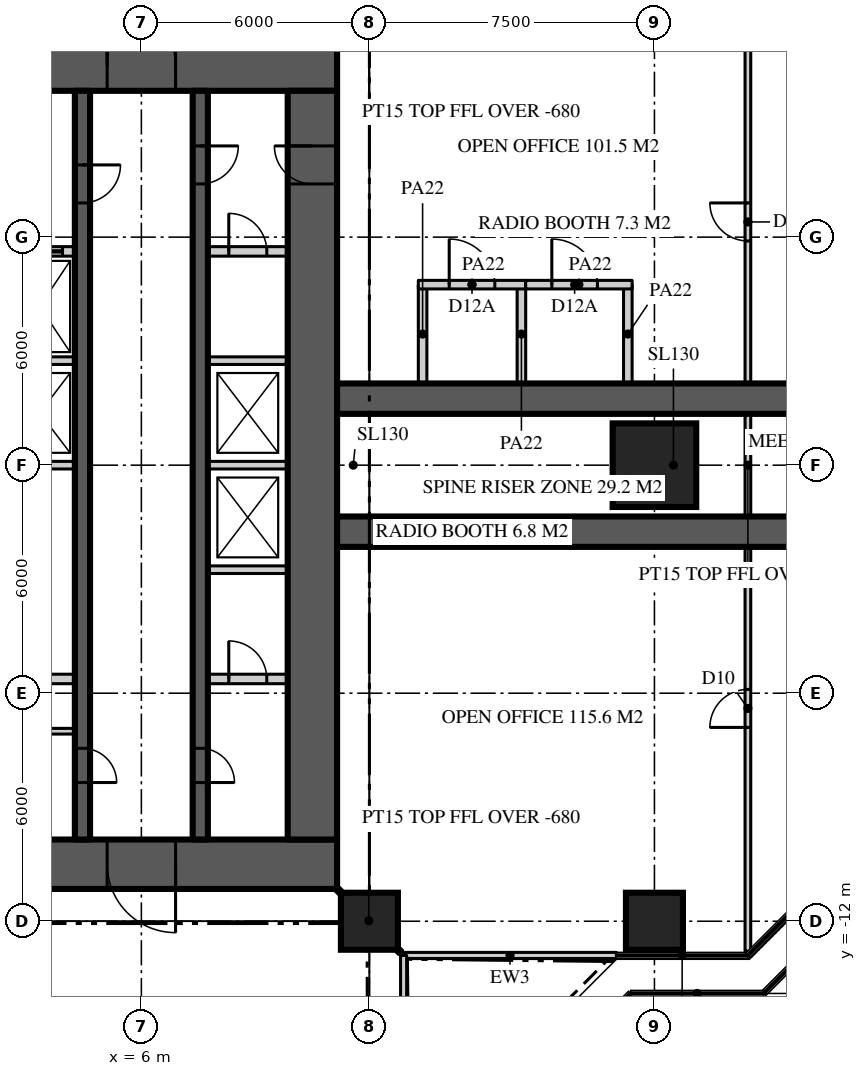
"""IFC4 building model, lengths in metres.
Left out: names, types, materials, properties, quantities, classifications, styles, units other than length and angle.
Written with IfcOpenShell. Run it as: python <this file> out.ifc"""

import sys

from ifc_helpers import new_model, si_unit, direction, frame, frame_2d, origin, origin_2d, place, context, subcontext, project, spatial, rectangle, extrude, element, fill, save


model = new_model("IFC4")
c1 = context("Model", 3, precision=1e-05, world=origin(), true_north=direction((0.0, 1.0)))
c2 = subcontext(c1, "Body", "Model", "MODEL_VIEW")
j1 = project(units=[si_unit("LENGTHUNIT", "METRE"), si_unit("PLANEANGLEUNIT", "RADIAN")], contexts=[c1])
p1 = place(None, origin())
s1 = spatial("IfcSite", under=j1, at=p1, CompositionType="ELEMENT")
p2 = place(p1, origin())
s2 = spatial("IfcBuilding", under=s1, at=p2, CompositionType="ELEMENT")
p3 = place(p2, frame((0.0, 0.0, 212.7)))
s3 = spatial("IfcBuildingStorey", under=s2, at=p3, CompositionType="ELEMENT", Elevation=212.7)
p4 = place(p3, frame((-11.15, 10.5, 0.0), z_axis=(0.0, 0.0, 1.0), x_axis=(1.0, 0.0, 0.0)))
e1 = element("IfcWall", 1, at=p4, inside=s3, PredefinedType="SHEAR", context=c2, shape_type="SweptSolid", body=[
    extrude(rectangle(XDim=22.3, YDim=1.3, at=frame_2d((11.15, 0.0))), origin(), (0.0, 0.0, 1.0), 3.9),
])
p5 = place(p4, frame((4.25, 0.0, 0.0)))
e2 = element("IfcOpeningElement", 2, at=p5, cuts=e1, PredefinedType="OPENING", context=c2, shape_type="SweptSolid", body=[
    extrude(rectangle(XDim=1.8, YDim=2.2, at=frame_2d((0.9, 1.1))), frame((0.0, 0.66, 0.0), z_axis=(0.0, -1.0, 0.0), x_axis=(1.0, 0.0, 0.0)), (0.0, 0.0, 1.0), 1.32),
])
p6 = place(p4, frame((16.25, 0.0, 0.0)))
e3 = element("IfcOpeningElement", 3, at=p6, cuts=e1, PredefinedType="OPENING", context=c2, shape_type="SweptSolid", body=[
    extrude(rectangle(XDim=1.8, YDim=2.2, at=frame_2d((0.9, 1.1))), frame((0.0, 0.66, 0.0), z_axis=(0.0, -1.0, 0.0), x_axis=(1.0, 0.0, 0.0)), (0.0, 0.0, 1.0), 1.32),
])
p7 = place(p3, frame((11.15, -10.5, 0.0), z_axis=(0.0, 0.0, 1.0), x_axis=(-1.0, 0.0, 0.0)))
e4 = element("IfcWall", 4, at=p7, inside=s3, PredefinedType="SHEAR", context=c2, shape_type="SweptSolid", body=[
    extrude(rectangle(XDim=22.3, YDim=1.3, at=frame_2d((11.15, 0.0))), origin(), (0.0, 0.0, 1.0), 3.9),
])
p8 = place(p7, frame((16.25, 0.0, 0.0)))
e5 = element("IfcOpeningElement", 5, at=p8, cuts=e4, PredefinedType="OPENING", context=c2, shape_type="SweptSolid", body=[
    extrude(rectangle(XDim=1.8, YDim=2.2, at=frame_2d((0.9, 1.1))), frame((0.0, 0.66, 0.0), z_axis=(0.0, -1.0, 0.0), x_axis=(1.0, 0.0, 0.0)), (0.0, 0.0, 1.0), 1.32),
])
p9 = place(p7, frame((4.25, 0.0, 0.0)))
e6 = element("IfcOpeningElement", 6, at=p9, cuts=e4, PredefinedType="OPENING", context=c2, shape_type="SweptSolid", body=[
    extrude(rectangle(XDim=1.8, YDim=2.2, at=frame_2d((0.9, 1.1))), frame((0.0, 0.66, 0.0), z_axis=(0.0, -1.0, 0.0), x_axis=(1.0, 0.0, 0.0)), (0.0, 0.0, 1.0), 1.32),
])
p10 = place(p3, frame((10.5, -9.85, 0.0), z_axis=(0.0, 0.0, 1.0), x_axis=(0.0, 1.0, 0.0)))
e7 = element("IfcWall", 7, at=p10, inside=s3, PredefinedType="SHEAR", context=c2, shape_type="SweptSolid", body=[
    extrude(rectangle(XDim=19.7, YDim=1.3, at=frame_2d((9.85, 0.0))), origin(), (0.0, 0.0, 1.0), 3.9),
])
p11 = place(p10, frame((17.25, 0.0, 0.0)))
e8 = element("IfcOpeningElement", 8, at=p11, cuts=e7, PredefinedType="OPENING", context=c2, shape_type="SweptSolid", body=[
    extrude(rectangle(XDim=1.0, YDim=2.2, at=frame_2d((0.5, 1.1))), frame((0.0, 0.66, 0.0), z_axis=(0.0, -1.0, 0.0), x_axis=(1.0, 0.0, 0.0)), (0.0, 0.0, 1.0), 1.32),
])
for number, where, z_axis, x_axis in (
    (9, (11.15, -1.75, 0.0), (0.0, 0.0, 1.0), (1.0, 0.0, 0.0)),
    (10, (11.15, 1.75, 0.0), (0.0, 0.0, 1.0), (1.0, 0.0, 0.0)),
):
    element("IfcWall", number, at=place(p3, frame(where, z_axis=z_axis, x_axis=x_axis)), inside=s3, PredefinedType="SHEAR", context=c2, shape_type="SweptSolid", body=[
        extrude(rectangle(XDim=15.25, YDim=0.8, at=frame_2d((7.625, 0.0))), origin(), (0.0, 0.0, 1.0), 3.9),
    ])
for number, where, z_axis, x_axis in (
    (11, (12.0, -12.0, 0.0), (0.0, 0.0, 1.0), (1.0, 0.0, 0.0)),
    (12, (19.5, -12.0, 0.0), (0.0, 0.0, 1.0), (1.0, 0.0, 0.0)),
):
    element("IfcColumn", number, at=place(p3, frame(where, z_axis=z_axis, x_axis=x_axis)), inside=s3, PredefinedType="COLUMN", context=c2, shape_type="SweptSolid", body=[
        extrude(rectangle(XDim=1.5, YDim=1.5, at=origin_2d()), origin(), (0.0, 0.0, 1.0), 3.9),
    ])
p12 = place(p3, frame((19.5, 0.0, 0.0), z_axis=(0.0, 0.0, 1.0), x_axis=(1.0, 0.0, 0.0)))
e13 = element("IfcColumn", 13, at=p12, inside=s3, PredefinedType="COLUMN", context=c2, shape_type="SweptSolid", body=[
    extrude(rectangle(XDim=2.2, YDim=2.2, at=origin_2d()), origin(), (0.0, 0.0, 1.0), 3.9),
])
p13 = place(p3, frame((12.9, -12.9, 0.0), z_axis=(0.0, 0.0, 1.0), x_axis=(1.0, 0.0, 0.0)))
e14 = element("IfcWall", 14, at=p13, inside=s3, PredefinedType="SOLIDWALL", context=c2, shape_type="SweptSolid", body=[
    extrude(rectangle(XDim=5.6, YDim=0.16, at=frame_2d((2.8, 0.0))), origin(), (0.0, 0.0, 1.0), 3.77),
])
p14 = place(p3, frame((12.9, -18.5, 0.0), z_axis=(0.0, 0.0, 1.0), x_axis=(0.0, 1.0, 0.0)))
e15 = element("IfcWall", 15, at=p14, inside=s3, PredefinedType="SOLIDWALL", context=c2, shape_type="SweptSolid", body=[
    extrude(rectangle(XDim=5.6, YDim=0.16, at=frame_2d((2.8, 0.0))), origin(), (0.0, 0.0, 1.0), 3.77),
])
p15 = place(p14, frame((2.3, 0.0, 0.0)))
e16 = element("IfcOpeningElement", 16, at=p15, cuts=e15, PredefinedType="OPENING", context=c2, shape_type="SweptSolid", body=[
    extrude(rectangle(XDim=1.0, YDim=2.2, at=frame_2d((0.5, 1.1))), frame((0.0, 0.09, 0.0), z_axis=(0.0, -1.0, 0.0), x_axis=(1.0, 0.0, 0.0)), (0.0, 0.0, 1.0), 0.18),
])
p16 = place(p3, frame((7.55, 9.85, 0.0), z_axis=(0.0, 0.0, 1.0), x_axis=(0.0, -1.0, 0.0)))
e17 = element("IfcWall", 17, at=p16, inside=s3, PredefinedType="SHEAR", context=c2, shape_type="SweptSolid", body=[
    extrude(rectangle(XDim=19.7, YDim=0.4, at=frame_2d((9.85, 0.0))), origin(), (0.0, 0.0, 1.0), 3.9),
])
p17 = place(p16, frame((1.45, 0.0, 0.0)))
e18 = element("IfcOpeningElement", 18, at=p17, cuts=e17, PredefinedType="OPENING", context=c2, shape_type="SweptSolid", body=[
    extrude(rectangle(XDim=1.0, YDim=2.2, at=frame_2d((0.5, 1.1))), frame((0.0, 0.21, 0.0), z_axis=(0.0, -1.0, 0.0), x_axis=(1.0, 0.0, 0.0)), (0.0, 0.0, 1.0), 0.42),
])
p18 = place(p16, frame((17.3, 0.0, 0.0)))
e19 = element("IfcOpeningElement", 19, at=p18, cuts=e17, PredefinedType="OPENING", context=c2, shape_type="SweptSolid", body=[
    extrude(rectangle(XDim=0.9, YDim=2.1, at=frame_2d((0.45, 1.05))), frame((0.0, 0.21, 0.0), z_axis=(0.0, -1.0, 0.0), x_axis=(1.0, 0.0, 0.0)), (0.0, 0.0, 1.0), 0.42),
])
p19 = place(p3, frame((4.45, 9.85, 0.0), z_axis=(0.0, 0.0, 1.0), x_axis=(0.0, -1.0, 0.0)))
e20 = element("IfcWall", 20, at=p19, inside=s3, PredefinedType="SHEAR", context=c2, shape_type="SweptSolid", body=[
    extrude(rectangle(XDim=19.7, YDim=0.4, at=frame_2d((9.85, 0.0))), origin(), (0.0, 0.0, 1.0), 3.9),
])
p20 = place(p19, frame((1.95, 0.0, 0.0)))
e21 = element("IfcOpeningElement", 21, at=p20, cuts=e20, PredefinedType="OPENING", context=c2, shape_type="SweptSolid", body=[
    extrude(rectangle(XDim=1.0, YDim=2.2, at=frame_2d((0.5, 1.1))), frame((0.0, 0.21, 0.0), z_axis=(0.0, -1.0, 0.0), x_axis=(1.0, 0.0, 0.0)), (0.0, 0.0, 1.0), 0.42),
])
p21 = place(p19, frame((17.3, 0.0, 0.0)))
e22 = element("IfcOpeningElement", 22, at=p21, cuts=e20, PredefinedType="OPENING", context=c2, shape_type="SweptSolid", body=[
    extrude(rectangle(XDim=0.9, YDim=2.1, at=frame_2d((0.45, 1.05))), frame((0.0, 0.21, 0.0), z_axis=(0.0, -1.0, 0.0), x_axis=(1.0, 0.0, 0.0)), (0.0, 0.0, 1.0), 0.42),
])
p22 = place(p3, frame((2.4, 5.625, 0.0), z_axis=(0.0, 0.0, 1.0), x_axis=(1.0, 0.0, 0.0)))
e23 = element("IfcWall", 23, at=p22, inside=s3, PredefinedType="SOLIDWALL", context=c2, shape_type="SweptSolid", body=[
    extrude(rectangle(XDim=1.85, YDim=0.25, at=frame_2d((0.925, 0.0))), origin(), (0.0, 0.0, 1.0), 3.7),
])
p23 = place(p22, frame((0.325, 0.0, 0.0)))
e24 = element("IfcOpeningElement", 24, at=p23, cuts=e23, PredefinedType="OPENING", context=c2, shape_type="SweptSolid", body=[
    extrude(rectangle(XDim=1.2, YDim=2.2, at=frame_2d((0.6, 1.1))), frame((0.0, 0.135, 0.0), z_axis=(0.0, -1.0, 0.0), x_axis=(1.0, 0.0, 0.0)), (0.0, 0.0, 1.0), 0.27),
])
p24 = place(p3, frame((7.75, 5.625, 0.0), z_axis=(0.0, 0.0, 1.0), x_axis=(1.0, 0.0, 0.0)))
e25 = element("IfcWall", 25, at=p24, inside=s3, PredefinedType="SOLIDWALL", context=c2, shape_type="SweptSolid", body=[
    extrude(rectangle(XDim=2.1, YDim=0.25, at=frame_2d((1.05, 0.0))), origin(), (0.0, 0.0, 1.0), 3.7),
])
p25 = place(p24, frame((0.55, 0.0, 0.0)))
e26 = element("IfcOpeningElement", 26, at=p25, cuts=e25, PredefinedType="OPENING", context=c2, shape_type="SweptSolid", body=[
    extrude(rectangle(XDim=1.0, YDim=2.2, at=frame_2d((0.5, 1.1))), frame((0.0, 0.135, 0.0), z_axis=(0.0, -1.0, 0.0), x_axis=(1.0, 0.0, 0.0)), (0.0, 0.0, 1.0), 0.27),
])
p26 = place(p3, frame((2.4, -5.625, 0.0), z_axis=(0.0, 0.0, 1.0), x_axis=(1.0, 0.0, 0.0)))
e27 = element("IfcWall", 27, at=p26, inside=s3, PredefinedType="SOLIDWALL", context=c2, shape_type="SweptSolid", body=[
    extrude(rectangle(XDim=1.85, YDim=0.25, at=frame_2d((0.925, 0.0))), origin(), (0.0, 0.0, 1.0), 3.7),
])
p27 = place(p3, frame((7.75, -5.625, 0.0), z_axis=(0.0, 0.0, 1.0), x_axis=(1.0, 0.0, 0.0)))
e28 = element("IfcWall", 28, at=p27, inside=s3, PredefinedType="SOLIDWALL", context=c2, shape_type="SweptSolid", body=[
    extrude(rectangle(XDim=2.1, YDim=0.25, at=frame_2d((1.05, 0.0))), origin(), (0.0, 0.0, 1.0), 3.7),
])
p28 = place(p27, frame((0.55, 0.0, 0.0)))
e29 = element("IfcOpeningElement", 29, at=p28, cuts=e28, PredefinedType="OPENING", context=c2, shape_type="SweptSolid", body=[
    extrude(rectangle(XDim=1.0, YDim=2.2, at=frame_2d((0.5, 1.1))), frame((0.0, 0.135, 0.0), z_axis=(0.0, -1.0, 0.0), x_axis=(1.0, 0.0, 0.0)), (0.0, 0.0, 1.0), 0.27),
])
p29 = place(p3, frame((7.75, -2.75, 0.0), z_axis=(0.0, 0.0, 1.0), x_axis=(1.0, 0.0, 0.0)))
e30 = element("IfcWall", 30, at=p29, inside=s3, PredefinedType="SOLIDWALL", context=c2, shape_type="SweptSolid", body=[
    extrude(rectangle(XDim=2.1, YDim=0.2, at=frame_2d((1.05, 0.0))), origin(), (0.0, 0.0, 1.0), 3.7),
])
p30 = place(p3, frame((2.4, 0.0, 0.0), z_axis=(0.0, 0.0, 1.0), x_axis=(1.0, 0.0, 0.0)))
e31 = element("IfcWall", 31, at=p30, inside=s3, PredefinedType="SOLIDWALL", context=c2, shape_type="SweptSolid", body=[
    extrude(rectangle(XDim=1.85, YDim=0.2, at=frame_2d((0.925, 0.0))), origin(), (0.0, 0.0, 1.0), 3.7),
])
p31 = place(p3, frame((7.75, 0.0, 0.0), z_axis=(0.0, 0.0, 1.0), x_axis=(1.0, 0.0, 0.0)))
e32 = element("IfcWall", 32, at=p31, inside=s3, PredefinedType="SOLIDWALL", context=c2, shape_type="SweptSolid", body=[
    extrude(rectangle(XDim=2.1, YDim=0.2, at=frame_2d((1.05, 0.0))), origin(), (0.0, 0.0, 1.0), 3.7),
])
p32 = place(p3, frame((2.4, 2.75, 0.0), z_axis=(0.0, 0.0, 1.0), x_axis=(1.0, 0.0, 0.0)))
e33 = element("IfcWall", 33, at=p32, inside=s3, PredefinedType="SOLIDWALL", context=c2, shape_type="SweptSolid", body=[
    extrude(rectangle(XDim=1.85, YDim=0.2, at=frame_2d((0.925, 0.0))), origin(), (0.0, 0.0, 1.0), 3.7),
])
p33 = place(p3, frame((7.75, 2.75, 0.0), z_axis=(0.0, 0.0, 1.0), x_axis=(1.0, 0.0, 0.0)))
e34 = element("IfcWall", 34, at=p33, inside=s3, PredefinedType="SOLIDWALL", context=c2, shape_type="SweptSolid", body=[
    extrude(rectangle(XDim=2.1, YDim=0.2, at=frame_2d((1.05, 0.0))), origin(), (0.0, 0.0, 1.0), 3.7),
])
p34 = place(p3, frame((21.959, -12.786, 0.0), z_axis=(0.0, 0.0, 1.0), x_axis=(0.0, 1.0, 0.0)))
e35 = element("IfcWall", 35, at=p34, inside=s3, PredefinedType="PARTITIONING", context=c2, shape_type="SweptSolid", body=[
    extrude(rectangle(XDim=25.573, YDim=0.15, at=frame_2d((12.786, 0.0))), origin(), (0.0, 0.0, 1.0), 3.77),
])
p35 = place(p34, frame((18.687, 0.0, 0.0)))
e36 = element("IfcOpeningElement", 36, at=p35, cuts=e35, PredefinedType="OPENING", context=c2, shape_type="SweptSolid", body=[
    extrude(rectangle(XDim=1.0, YDim=2.2, at=frame_2d((0.5, 1.1))), frame((0.0, 0.085, 0.0), z_axis=(0.0, -1.0, 0.0), x_axis=(1.0, 0.0, 0.0)), (0.0, 0.0, 1.0), 0.17),
])
p36 = place(p34, frame((5.886, 0.0, 0.0)))
e37 = element("IfcOpeningElement", 37, at=p36, cuts=e35, PredefinedType="OPENING", context=c2, shape_type="SweptSolid", body=[
    extrude(rectangle(XDim=1.0, YDim=2.2, at=frame_2d((0.5, 1.1))), frame((0.0, 0.085, 0.0), z_axis=(0.0, -1.0, 0.0), x_axis=(1.0, 0.0, 0.0)), (0.0, 0.0, 1.0), 0.17),
])
for number, where, z_axis, x_axis in (
    (38, (13.4, 2.15, 0.0), (0.0, 0.0, 1.0), (0.0, 1.0, 0.0)),
    (39, (16.0, 2.15, 0.0), (0.0, 0.0, 1.0), (0.0, 1.0, 0.0)),
):
    element("IfcWall", number, at=place(p3, frame(where, z_axis=z_axis, x_axis=x_axis)), inside=s3, PredefinedType="PARTITIONING", context=c2, shape_type="SweptSolid", body=[
        extrude(rectangle(XDim=2.6, YDim=0.225, at=frame_2d((1.3, 0.0))), origin(), (0.0, 0.0, 1.0), 3.77),
    ])
p37 = place(p3, frame((13.288, 4.75, 0.0), z_axis=(0.0, 0.0, 1.0), x_axis=(1.0, 0.0, 0.0)))
e40 = element("IfcWall", 40, at=p37, inside=s3, PredefinedType="PARTITIONING", context=c2, shape_type="SweptSolid", body=[
    extrude(rectangle(XDim=2.825, YDim=0.225, at=frame_2d((1.413, 0.0))), origin(), (0.0, 0.0, 1.0), 3.77),
])
p38 = place(p37, frame((0.812, 0.0, 0.0)))
e41 = element("IfcOpeningElement", 41, at=p38, cuts=e40, PredefinedType="OPENING", context=c2, shape_type="SweptSolid", body=[
    extrude(rectangle(XDim=1.2, YDim=2.2, at=frame_2d((0.6, 1.1))), frame((0.0, 0.123, 0.0), z_axis=(0.0, -1.0, 0.0), x_axis=(1.0, 0.0, 0.0)), (0.0, 0.0, 1.0), 0.245),
])
p39 = place(p3, frame((18.8, 2.15, 0.0), z_axis=(0.0, 0.0, 1.0), x_axis=(0.0, 1.0, 0.0)))
e42 = element("IfcWall", 42, at=p39, inside=s3, PredefinedType="PARTITIONING", context=c2, shape_type="SweptSolid", body=[
    extrude(rectangle(XDim=2.6, YDim=0.225, at=frame_2d((1.3, 0.0))), origin(), (0.0, 0.0, 1.0), 3.77),
])
p40 = place(p3, frame((16.113, 4.75, 0.0), z_axis=(0.0, 0.0, 1.0), x_axis=(1.0, 0.0, 0.0)))
e43 = element("IfcWall", 43, at=p40, inside=s3, PredefinedType="PARTITIONING", context=c2, shape_type="SweptSolid", body=[
    extrude(rectangle(XDim=2.8, YDim=0.225, at=frame_2d((1.4, 0.0))), origin(), (0.0, 0.0, 1.0), 3.77),
])
p41 = place(p40, frame((0.688, 0.0, 0.0)))
e44 = element("IfcOpeningElement", 44, at=p41, cuts=e43, PredefinedType="OPENING", context=c2, shape_type="SweptSolid", body=[
    extrude(rectangle(XDim=1.2, YDim=2.2, at=frame_2d((0.6, 1.1))), frame((0.0, 0.123, 0.0), z_axis=(0.0, -1.0, 0.0), x_axis=(1.0, 0.0, 0.0)), (0.0, 0.0, 1.0), 0.245),
])
p42 = place(p3, frame((11.15, -11.15, 0.0), z_axis=(0.0, 0.0, 1.0), x_axis=(0.707106781187, -0.707106781187, 0.0)))
e45 = element("IfcWall", 45, at=p42, inside=s3, PredefinedType="PARTITIONING", context=c2, shape_type="SweptSolid", body=[
    extrude(rectangle(XDim=2.362, YDim=0.15, at=frame_2d((1.181, 0.0))), origin(), (0.0, 0.0, 1.0), 3.22),
])
p43 = place(p3, frame((2.4, -7.0, 0.0), z_axis=(0.0, 0.0, 1.0), x_axis=(1.0, 0.0, 0.0)))
e46 = element("IfcWall", 46, at=p43, inside=s3, PredefinedType="SOLIDWALL", context=c2, shape_type="SweptSolid", body=[
    extrude(rectangle(XDim=1.85, YDim=0.15, at=frame_2d((0.925, 0.0))), origin(), (0.0, 0.0, 1.0), 3.77),
])
p44 = place(p43, frame((0.1, 0.0, 0.0)))
e47 = element("IfcOpeningElement", 47, at=p44, cuts=e46, PredefinedType="OPENING", context=c2, shape_type="SweptSolid", body=[
    extrude(rectangle(XDim=0.9, YDim=2.1, at=frame_2d((0.45, 1.05))), frame((0.0, 0.085, 0.0), z_axis=(0.0, -1.0, 0.0), x_axis=(1.0, 0.0, 0.0)), (0.0, 0.0, 1.0), 0.17),
])
p45 = place(p6, origin())
e48 = element("IfcDoor", 48, at=p45, inside=s3, OperationType="DOUBLE_DOOR_DOUBLE_SWING", PredefinedType="DOOR", context=c2, shape_type="SweptSolid", body=[
    extrude(rectangle(XDim=1.8, YDim=2.2, at=frame_2d((0.9, 1.1))), frame((0.0, 0.025, 0.0), z_axis=(0.0, -1.0, 0.0), x_axis=(1.0, 0.0, 0.0)), (0.0, 0.0, 1.0), 0.05),
])
fill(e3, e48)
p46 = place(p9, origin())
e49 = element("IfcDoor", 49, at=p46, inside=s3, OperationType="DOUBLE_DOOR_DOUBLE_SWING", PredefinedType="DOOR", context=c2, shape_type="SweptSolid", body=[
    extrude(rectangle(XDim=1.8, YDim=2.2, at=frame_2d((0.9, 1.1))), frame((0.0, 0.025, 0.0), z_axis=(0.0, -1.0, 0.0), x_axis=(1.0, 0.0, 0.0)), (0.0, 0.0, 1.0), 0.05),
])
fill(e6, e49)
p47 = place(p17, origin())
e50 = element("IfcDoor", 50, at=p47, inside=s3, OperationType="SINGLE_SWING_LEFT", PredefinedType="DOOR", context=c2, shape_type="SweptSolid", body=[
    extrude(rectangle(XDim=1.0, YDim=2.2, at=frame_2d((0.5, 1.1))), frame((0.0, 0.025, 0.0), z_axis=(0.0, -1.0, 0.0), x_axis=(1.0, 0.0, 0.0)), (0.0, 0.0, 1.0), 0.05),
])
fill(e18, e50)
p48 = place(p11, origin())
e51 = element("IfcDoor", 51, at=p48, inside=s3, OperationType="SINGLE_SWING_RIGHT", PredefinedType="DOOR", context=c2, shape_type="SweptSolid", body=[
    extrude(rectangle(XDim=1.0, YDim=2.2, at=frame_2d((0.5, 1.1))), frame((0.0, 0.025, 0.0), z_axis=(0.0, -1.0, 0.0), x_axis=(1.0, 0.0, 0.0)), (0.0, 0.0, 1.0), 0.05),
])
fill(e8, e51)
p49 = place(p20, origin())
e52 = element("IfcDoor", 52, at=p49, inside=s3, OperationType="SINGLE_SWING_LEFT", PredefinedType="DOOR", context=c2, shape_type="SweptSolid", body=[
    extrude(rectangle(XDim=1.0, YDim=2.2, at=frame_2d((0.5, 1.1))), frame((0.0, 0.025, 0.0), z_axis=(0.0, -1.0, 0.0), x_axis=(1.0, 0.0, 0.0)), (0.0, 0.0, 1.0), 0.05),
])
fill(e21, e52)
p50 = place(p18, origin())
e53 = element("IfcDoor", 53, at=p50, inside=s3, OperationType="SINGLE_SWING_RIGHT", PredefinedType="DOOR", context=c2, shape_type="SweptSolid", body=[
    extrude(rectangle(XDim=0.9, YDim=2.1, at=frame_2d((0.45, 1.05))), frame((0.0, 0.025, 0.0), z_axis=(0.0, -1.0, 0.0), x_axis=(1.0, 0.0, 0.0)), (0.0, 0.0, 1.0), 0.05),
])
fill(e19, e53)
p51 = place(p21, origin())
e54 = element("IfcDoor", 54, at=p51, inside=s3, OperationType="SINGLE_SWING_RIGHT", PredefinedType="DOOR", context=c2, shape_type="SweptSolid", body=[
    extrude(rectangle(XDim=0.9, YDim=2.1, at=frame_2d((0.45, 1.05))), frame((0.0, 0.025, 0.0), z_axis=(0.0, -1.0, 0.0), x_axis=(1.0, 0.0, 0.0)), (0.0, 0.0, 1.0), 0.05),
])
fill(e22, e54)
p52 = place(p23, origin())
e55 = element("IfcDoor", 55, at=p52, inside=s3, OperationType="SLIDING_TO_LEFT", PredefinedType="DOOR", context=c2, shape_type="SweptSolid", body=[
    extrude(rectangle(XDim=1.2, YDim=2.2, at=frame_2d((0.6, 1.1))), frame((0.0, 0.025, 0.0), z_axis=(0.0, -1.0, 0.0), x_axis=(1.0, 0.0, 0.0)), (0.0, 0.0, 1.0), 0.05),
])
fill(e24, e55)
p53 = place(p35, origin())
e56 = element("IfcDoor", 56, at=p53, inside=s3, OperationType="SINGLE_SWING_RIGHT", PredefinedType="DOOR", context=c2, shape_type="SweptSolid", body=[
    extrude(rectangle(XDim=1.0, YDim=2.2, at=frame_2d((0.5, 1.1))), frame((0.0, 0.025, 0.0), z_axis=(0.0, -1.0, 0.0), x_axis=(1.0, 0.0, 0.0)), (0.0, 0.0, 1.0), 0.05),
])
fill(e36, e56)
p54 = place(p36, origin())
e57 = element("IfcDoor", 57, at=p54, inside=s3, OperationType="SINGLE_SWING_LEFT", PredefinedType="DOOR", context=c2, shape_type="SweptSolid", body=[
    extrude(rectangle(XDim=1.0, YDim=2.2, at=frame_2d((0.5, 1.1))), frame((0.0, 0.025, 0.0), z_axis=(0.0, -1.0, 0.0), x_axis=(1.0, 0.0, 0.0)), (0.0, 0.0, 1.0), 0.05),
])
fill(e37, e57)
p55 = place(p38, origin())
e58 = element("IfcDoor", 58, at=p55, inside=s3, OperationType="SINGLE_SWING_LEFT", PredefinedType="DOOR", context=c2, shape_type="SweptSolid", body=[
    extrude(rectangle(XDim=1.2, YDim=2.2, at=frame_2d((0.6, 1.1))), frame((0.0, 0.025, 0.0), z_axis=(0.0, -1.0, 0.0), x_axis=(1.0, 0.0, 0.0)), (0.0, 0.0, 1.0), 0.05),
])
fill(e41, e58)
p56 = place(p41, origin())
e59 = element("IfcDoor", 59, at=p56, inside=s3, OperationType="SINGLE_SWING_LEFT", PredefinedType="DOOR", context=c2, shape_type="SweptSolid", body=[
    extrude(rectangle(XDim=1.2, YDim=2.2, at=frame_2d((0.6, 1.1))), frame((0.0, 0.025, 0.0), z_axis=(0.0, -1.0, 0.0), x_axis=(1.0, 0.0, 0.0)), (0.0, 0.0, 1.0), 0.05),
])
fill(e44, e59)
p57 = place(p25, origin())
e60 = element("IfcDoor", 60, at=p57, inside=s3, OperationType="SINGLE_SWING_LEFT", PredefinedType="DOOR", context=c2, shape_type="SweptSolid", body=[
    extrude(rectangle(XDim=1.0, YDim=2.2, at=frame_2d((0.5, 1.1))), frame((0.0, 0.025, 0.0), z_axis=(0.0, -1.0, 0.0), x_axis=(1.0, 0.0, 0.0)), (0.0, 0.0, 1.0), 0.05),
])
fill(e26, e60)
p58 = place(p28, origin())
e61 = element("IfcDoor", 61, at=p58, inside=s3, OperationType="SINGLE_SWING_LEFT", PredefinedType="DOOR", context=c2, shape_type="SweptSolid", body=[
    extrude(rectangle(XDim=1.0, YDim=2.2, at=frame_2d((0.5, 1.1))), frame((0.0, 0.025, 0.0), z_axis=(0.0, -1.0, 0.0), x_axis=(1.0, 0.0, 0.0)), (0.0, 0.0, 1.0), 0.05),
])
fill(e29, e61)
save(model, sys.argv[1])
